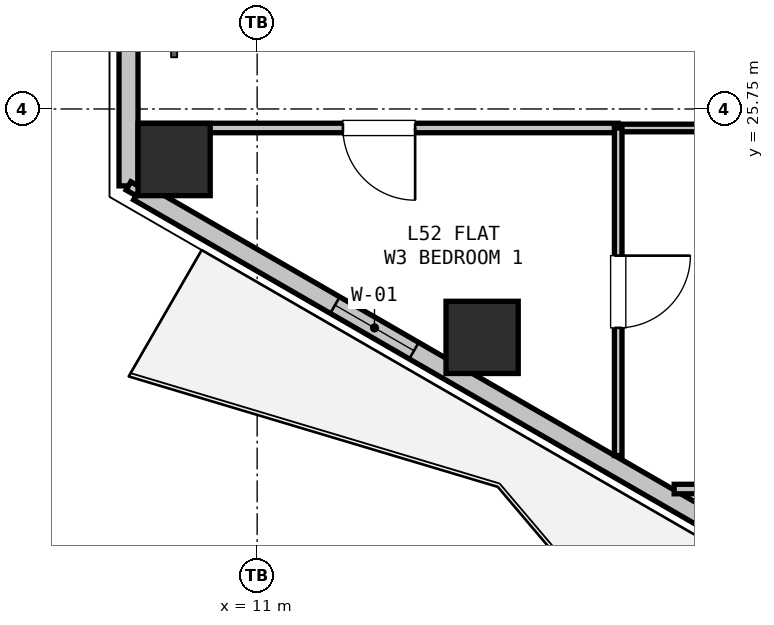
"""IFC4 building model, lengths in metres.
Left out: names, types, materials, properties, quantities, classifications, styles, units other than length and angle.
Written with IfcOpenShell. Run it as: python <this file> out.ifc"""

import sys

from ifc_helpers import new_model, si_unit, direction, frame, frame_2d, origin, origin_2d, place, context, subcontext, project, spatial, rectangle, hollow_rectangle, extrude, element, fill, save


model = new_model("IFC4")
c1 = context("Model", 3, precision=1e-05, world=origin(), true_north=direction((0.0, 1.0)))
c2 = subcontext(c1, "Body", "Model", "MODEL_VIEW")
j1 = project(units=[si_unit("LENGTHUNIT", "METRE"), si_unit("PLANEANGLEUNIT", "RADIAN")], contexts=[c1])
p1 = place(None, origin())
s1 = spatial("IfcSite", under=j1, at=p1, CompositionType="ELEMENT")
p2 = place(p1, origin())
s2 = spatial("IfcBuilding", under=s1, at=p2, CompositionType="ELEMENT")
p3 = place(p2, frame((0.0, 0.0, 188.7)))
s3 = spatial("IfcBuildingStorey", under=s2, at=p3, CompositionType="ELEMENT", Elevation=188.7)
for number, where, z_axis, x_axis in (
    (1, (13.96, 22.745, 0.0), (0.0, 0.0, 1.0), (1.0, 0.0, 0.0)),
    (2, (9.907, 25.085, 0.0), (0.0, 0.0, 1.0), (1.0, 0.0, 0.0)),
):
    element("IfcColumn", number, at=place(p3, frame(where, z_axis=z_axis, x_axis=x_axis)), inside=s3, PredefinedType="COLUMN", context=c2, shape_type="SweptSolid", body=[
        extrude(hollow_rectangle(XDim=0.95, YDim=0.95, WallThickness=0.028, at=origin_2d()), origin(), (0.0, 0.0, 1.0), 3.3),
    ])
p4 = place(p3, frame((9.308, 24.738, 0.0), z_axis=(0.0, 0.0, 1.0), x_axis=(0.0, 1.0, 0.0)))
e3 = element("IfcWall", 3, at=p4, inside=s3, PredefinedType="SOLIDWALL", context=c2, shape_type="SweptSolid", body=[
    extrude(rectangle(XDim=4.023, YDim=0.25, at=frame_2d((2.012, 0.0))), origin(), (0.0, 0.0, 1.0), 2.69),
])
p5 = place(p3, frame((17.837, 19.814, 0.0), z_axis=(0.0, 0.0, 1.0), x_axis=(-0.866027133173, 0.499997004599, 0.0)))
e4 = element("IfcWall", 4, at=p5, inside=s3, PredefinedType="SOLIDWALL", context=c2, shape_type="SweptSolid", body=[
    extrude(rectangle(XDim=9.699, YDim=0.25, at=frame_2d((4.849, 0.0))), origin(), (0.0, 0.0, 1.0), 2.69),
])
p6 = place(p5, frame((5.512, 0.0, 0.9)))
e5 = element("IfcOpeningElement", 5, at=p6, cuts=e4, PredefinedType="OPENING", context=c2, shape_type="SweptSolid", body=[
    extrude(rectangle(XDim=1.2, YDim=1.4, at=frame_2d((0.6, 0.7))), frame((0.0, 0.135, 0.0), z_axis=(0.0, -1.0, 0.0), x_axis=(1.0, 0.0, 0.0)), (0.0, 0.0, 1.0), 0.27),
])
p7 = place(p3, frame((21.95, 25.5, 0.0), z_axis=(0.0, 0.0, 1.0), x_axis=(-1.0, 0.0, 0.0)))
e6 = element("IfcWall", 6, at=p7, inside=s3, PredefinedType="PARTITIONING", context=c2, shape_type="SweptSolid", body=[
    extrude(rectangle(XDim=6.2, YDim=0.1, at=frame_2d((3.1, 0.0))), origin(), (0.0, 0.0, 1.0), 2.595),
])
p8 = place(p7, frame((2.625, 0.0, 0.0)))
e7 = element("IfcOpeningElement", 7, at=p8, cuts=e6, PredefinedType="OPENING", context=c2, shape_type="SweptSolid", body=[
    extrude(rectangle(XDim=0.95, YDim=2.1, at=frame_2d((0.475, 1.05))), frame((0.0, 0.06, 0.0), z_axis=(0.0, -1.0, 0.0), x_axis=(1.0, 0.0, 0.0)), (0.0, 0.0, 1.0), 0.12),
])
p9 = place(p3, frame((15.75, 25.5, 0.0), z_axis=(0.0, 0.0, 1.0), x_axis=(-1.0, 0.0, 0.0)))
e8 = element("IfcWall", 8, at=p9, inside=s3, PredefinedType="PARTITIONING", context=c2, shape_type="SweptSolid", body=[
    extrude(rectangle(XDim=6.293, YDim=0.125, at=frame_2d((3.147, 0.0))), origin(), (0.0, 0.0, 1.0), 2.735),
])
p10 = place(p9, frame((2.672, 0.0, 0.0)))
e9 = element("IfcOpeningElement", 9, at=p10, cuts=e8, PredefinedType="OPENING", context=c2, shape_type="SweptSolid", body=[
    extrude(rectangle(XDim=0.95, YDim=2.1, at=frame_2d((0.475, 1.05))), frame((0.0, 0.073, 0.0), z_axis=(0.0, -1.0, 0.0), x_axis=(1.0, 0.0, 0.0)), (0.0, 0.0, 1.0), 0.145),
])
p11 = place(p3, frame((9.437, 24.663, 0.0), z_axis=(0.0, 0.0, 1.0), x_axis=(-0.866239593359, 0.499628829129, 0.0)))
e10 = element("IfcWall", 10, at=p11, inside=s3, PredefinedType="PARTITIONING", context=c2, shape_type="SweptSolid", body=[
    extrude(rectangle(XDim=0.15, YDim=0.125, at=frame_2d((0.075, 0.0))), origin(), (0.0, 0.0, 1.0), 3.07),
])
p12 = place(p3, frame((15.75, 25.5, 0.0), z_axis=(0.0, 0.0, 1.0), x_axis=(0.0, -1.0, 0.0)))
e11 = element("IfcWall", 11, at=p12, inside=s3, PredefinedType="PARTITIONING", context=c2, shape_type="SweptSolid", body=[
    extrude(rectangle(XDim=4.309, YDim=0.1, at=frame_2d((2.155, 0.0))), origin(), (0.0, 0.0, 1.0), 2.365),
])
p13 = place(p12, frame((1.68, 0.0, 0.0)))
e12 = element("IfcOpeningElement", 12, at=p13, cuts=e11, PredefinedType="OPENING", context=c2, shape_type="SweptSolid", body=[
    extrude(rectangle(XDim=0.95, YDim=2.1, at=frame_2d((0.475, 1.05))), frame((0.0, 0.06, 0.0), z_axis=(0.0, -1.0, 0.0), x_axis=(1.0, 0.0, 0.0)), (0.0, 0.0, 1.0), 0.12),
])
p14 = place(p3, frame((20.0, 20.75, 0.0), z_axis=(0.0, 0.0, 1.0), x_axis=(-1.0, 0.0, 0.0)))
e13 = element("IfcWall", 13, at=p14, inside=s3, PredefinedType="PARTITIONING", context=c2, shape_type="SweptSolid", body=[
    extrude(rectangle(XDim=3.514, YDim=0.125, at=frame_2d((1.757, 0.0))), origin(), (0.0, 0.0, 1.0), 2.365),
])
p15 = place(p6, origin())
e14 = element("IfcWindow", 14, at=p15, inside=s3, PartitioningType="SINGLE_PANEL", PredefinedType="WINDOW", context=c2, shape_type="SweptSolid", body=[
    extrude(rectangle(XDim=1.2, YDim=1.4, at=frame_2d((0.6, 0.7))), frame((0.0, 0.03, 0.0), z_axis=(0.0, -1.0, 0.0), x_axis=(1.0, 0.0, 0.0)), (0.0, 0.0, 1.0), 0.06),
])
fill(e5, e14)
p16 = place(p10, origin())
e15 = element("IfcDoor", 15, at=p16, inside=s3, OperationType="SINGLE_SWING_LEFT", PredefinedType="DOOR", context=c2, shape_type="SweptSolid", body=[
    extrude(rectangle(XDim=0.95, YDim=2.1, at=frame_2d((0.475, 1.05))), frame((0.0, 0.025, 0.0), z_axis=(0.0, -1.0, 0.0), x_axis=(1.0, 0.0, 0.0)), (0.0, 0.0, 1.0), 0.05),
])
fill(e9, e15)
p17 = place(p13, origin())
e16 = element("IfcDoor", 16, at=p17, inside=s3, OperationType="SINGLE_SWING_LEFT", PredefinedType="DOOR", context=c2, shape_type="SweptSolid", body=[
    extrude(rectangle(XDim=0.95, YDim=2.1, at=frame_2d((0.475, 1.05))), frame((0.0, 0.025, 0.0), z_axis=(0.0, -1.0, 0.0), x_axis=(1.0, 0.0, 0.0)), (0.0, 0.0, 1.0), 0.05),
])
fill(e12, e16)
save(model, sys.argv[1])
